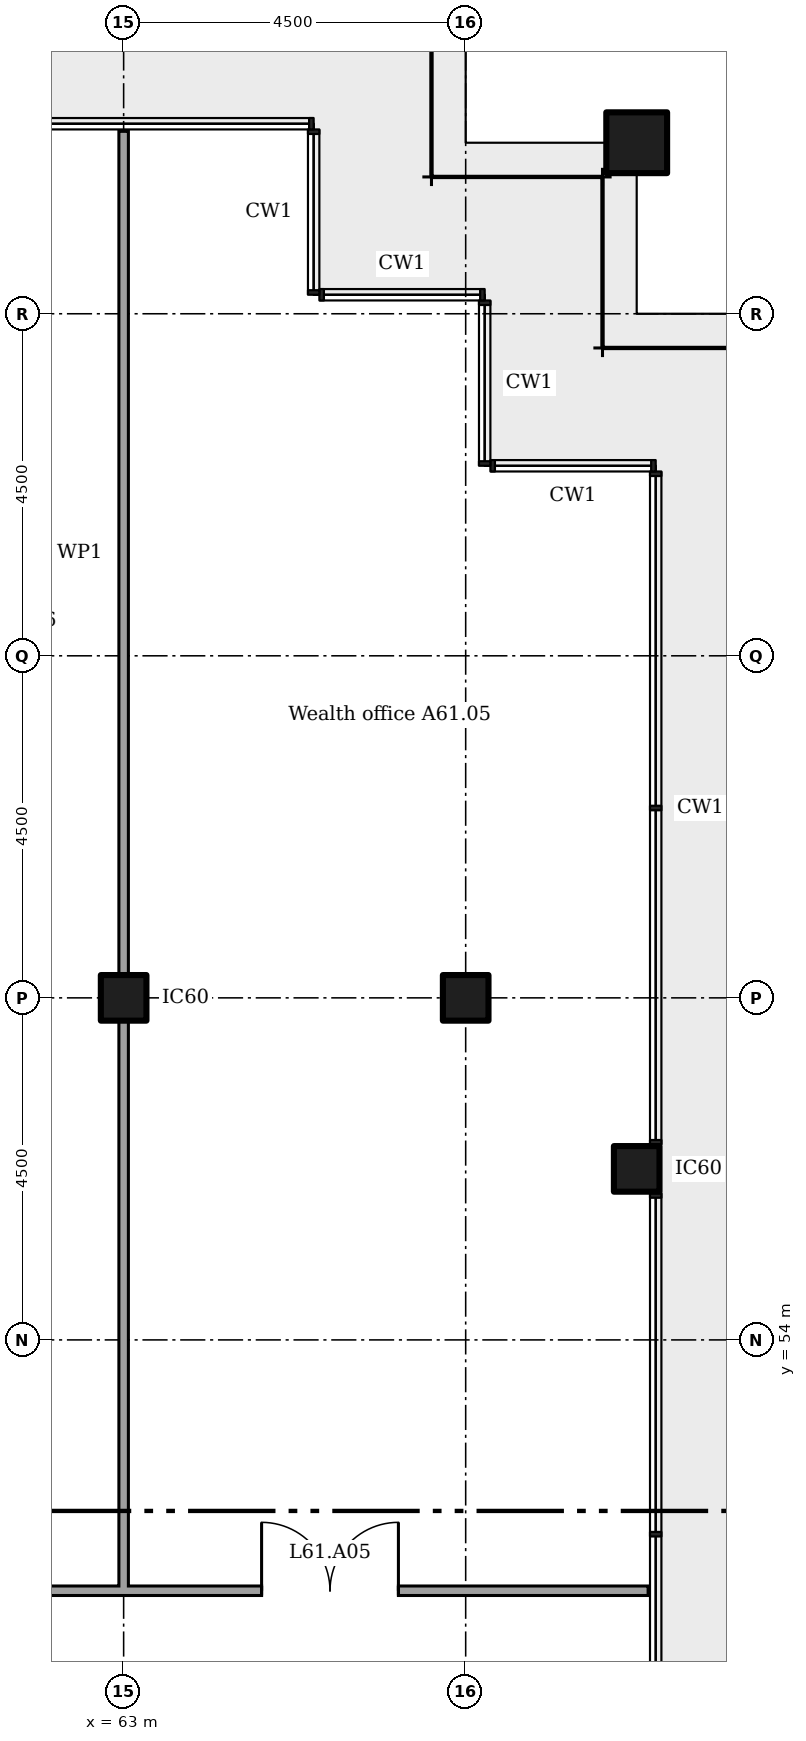
"""IFC4 building model, lengths in metres.
Left out: names, types, materials, properties, quantities, classifications, styles, units other than length and angle.
Written with IfcOpenShell. Run it as: python <this file> out.ifc"""

import sys

from ifc_helpers import new_model, si_unit, direction, frame, frame_2d, origin, origin_2d, place, context, subcontext, project, spatial, rectangle, extrude, element, fill, save


model = new_model("IFC4")
c1 = context("Model", 3, precision=1e-05, world=origin(), true_north=direction((0.0, 1.0)))
c2 = subcontext(c1, "Body", "Model", "MODEL_VIEW")
j1 = project(units=[si_unit("LENGTHUNIT", "METRE"), si_unit("PLANEANGLEUNIT", "RADIAN")], contexts=[c1])
p1 = place(None, origin())
s1 = spatial("IfcSite", under=j1, at=p1, CompositionType="ELEMENT")
p2 = place(p1, origin())
s2 = spatial("IfcBuilding", under=s1, at=p2, CompositionType="ELEMENT")
p3 = place(p2, frame((0.0, 0.0, 238.8)))
s3 = spatial("IfcBuildingStorey", under=s2, at=p3, CompositionType="ELEMENT", Elevation=238.8)
p4 = place(p3, frame((69.75, 69.75, 0.0)))
e1 = element("IfcColumn", 1, at=p4, inside=s3, PredefinedType="COLUMN", context=c2, shape_type="SweptSolid", body=[
    extrude(rectangle(XDim=0.8, YDim=0.8, at=origin_2d()), origin(), (0.0, 0.0, 1.0), 3.6),
])
for number, where in (
    (2, (63.0, 58.5, 0.0)),
    (3, (67.5, 58.5, 0.0)),
    (4, (69.75, 56.25, 0.0)),
):
    element("IfcColumn", number, at=place(p3, frame(where)), inside=s3, PredefinedType="COLUMN", context=c2, shape_type="SweptSolid", body=[
        extrude(rectangle(XDim=0.6, YDim=0.6, at=origin_2d()), origin(), (0.0, 0.0, 1.0), 3.6),
    ])
p5 = place(p3, frame((60.837, 50.7, 0.0)))
e5 = element("IfcWall", 5, at=p5, inside=s3, PredefinedType="PARTITIONING", context=c2, shape_type="SweptSolid", body=[
    extrude(rectangle(XDim=9.062, YDim=0.125, at=frame_2d((4.531, 0.0))), origin(), (0.0, 0.0, 1.0), 3.45),
])
p6 = place(p5, frame((3.978, 0.0, 0.0)))
e6 = element("IfcOpeningElement", 6, at=p6, cuts=e5, PredefinedType="OPENING", context=c2, shape_type="SweptSolid", body=[
    extrude(rectangle(XDim=1.8, YDim=2.1, at=frame_2d((0.9, 1.05))), frame((0.0, 0.073, 0.0), z_axis=(0.0, -1.0, 0.0), x_axis=(1.0, 0.0, 0.0)), (0.0, 0.0, 1.0), 0.145),
])
p7 = place(p3, frame((63.0, 50.7, 0.0), z_axis=(0.0, 0.0, 1.0), x_axis=(0.0, 1.0, 0.0)))
e7 = element("IfcWall", 7, at=p7, inside=s3, PredefinedType="PARTITIONING", context=c2, shape_type="SweptSolid", body=[
    extrude(rectangle(XDim=7.5, YDim=0.125, at=frame_2d((3.75, 0.0))), origin(), (0.0, 0.0, 1.0), 3.45),
])
p8 = place(p3, frame((63.0, 58.8, 0.0), z_axis=(0.0, 0.0, 1.0), x_axis=(0.0, 1.0, 0.0)))
e8 = element("IfcWall", 8, at=p8, inside=s3, PredefinedType="PARTITIONING", context=c2, shape_type="SweptSolid", body=[
    extrude(rectangle(XDim=11.1, YDim=0.125, at=frame_2d((5.55, 0.0))), origin(), (0.0, 0.0, 1.0), 2.772),
])
p9 = place(p6, origin())
e9 = element("IfcDoor", 9, at=p9, inside=s3, OperationType="DOUBLE_DOOR_SINGLE_SWING", PredefinedType="DOOR", context=c2, shape_type="SweptSolid", body=[
    extrude(rectangle(XDim=1.8, YDim=2.1, at=frame_2d((0.9, 1.05))), frame((0.0, 0.025, 0.0), z_axis=(0.0, -1.0, 0.0), x_axis=(1.0, 0.0, 0.0)), (0.0, 0.0, 1.0), 0.05),
])
fill(e6, e9)
save(model, sys.argv[1])
